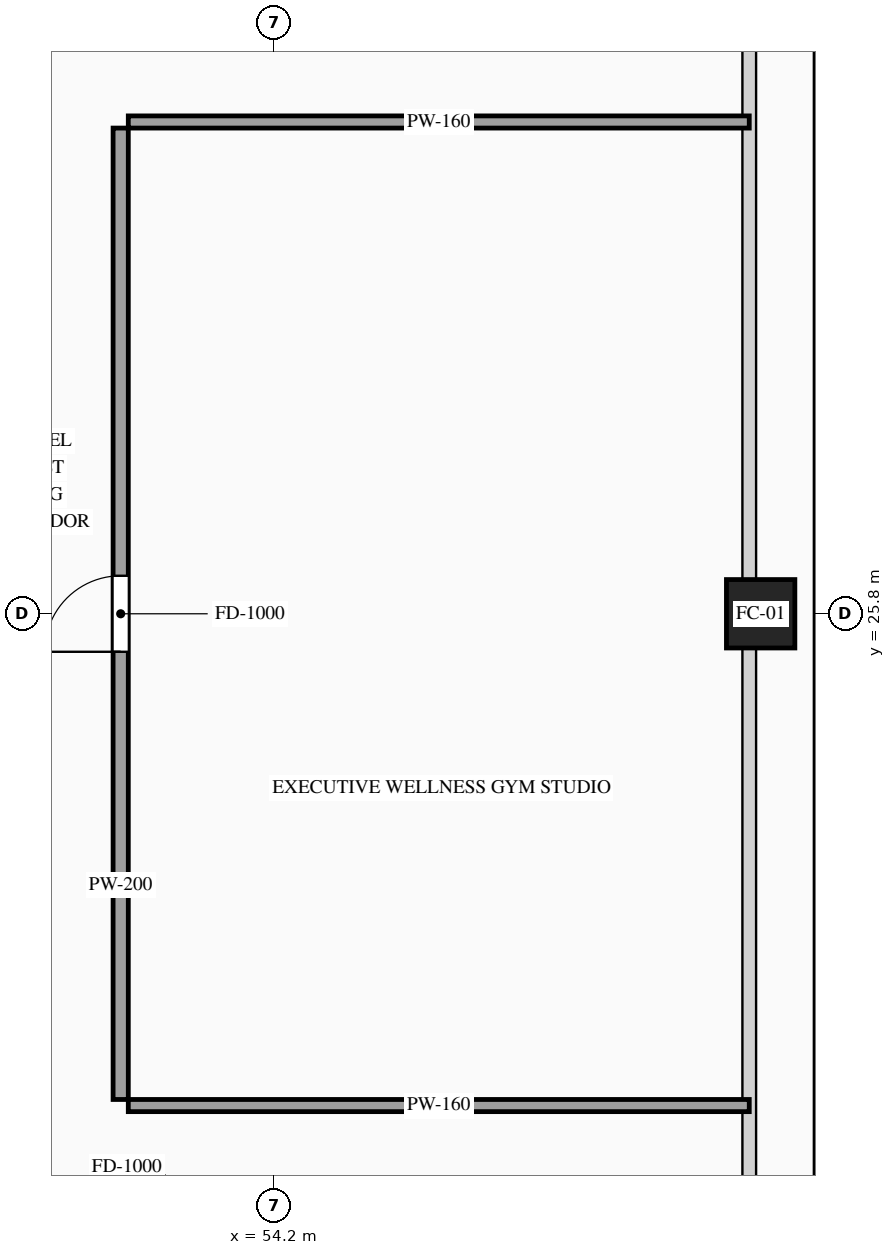
"""IFC4 building model, lengths in metres.
Left out: names, types, materials, properties, quantities, classifications, styles, units other than length and angle.
Written with IfcOpenShell. Run it as: python <this file> out.ifc"""

import sys

from ifc_helpers import new_model, si_unit, direction, frame, frame_2d, origin, origin_2d, place, context, subcontext, project, spatial, rectangle, hollow_rectangle, extrude, source, transform, mapped, element, fill, save


model = new_model("IFC4")
c1 = context("Model", 3, precision=1e-05, world=origin(), true_north=direction((0.0, 1.0)))
c2 = subcontext(c1, "Body", "Model", "MODEL_VIEW")
j1 = project(units=[si_unit("LENGTHUNIT", "METRE"), si_unit("PLANEANGLEUNIT", "RADIAN")], contexts=[c1])
p1 = place(None, origin())
s1 = spatial("IfcSite", under=j1, at=p1, CompositionType="ELEMENT")
p2 = place(p1, origin())
s2 = spatial("IfcBuilding", under=s1, at=p2, CompositionType="ELEMENT")
p3 = place(p2, frame((0.0, 0.0, 108.2)))
s3 = spatial("IfcBuildingStorey", under=s2, at=p3, CompositionType="ELEMENT", Elevation=108.2)
m1 = source(origin(), c2, "Body", "SweptSolid", [
    extrude(hollow_rectangle(XDim=0.9, YDim=0.9, WallThickness=0.042, at=origin_2d()), origin(), (0.0, 0.0, 1.0), 3.6),
])
p4 = place(p3, frame((60.6, 25.8, 0.0), z_axis=(0.0, 0.0, 1.0), x_axis=(1.0, 0.0, 0.0)))
e1 = element("IfcColumn", 1, at=p4, inside=s3, PredefinedType="COLUMN", context=c2, shape_type="MappedRepresentation", body=[
    mapped(m1, transform((0.0, 0.0, 0.0), scale=1.0)),
])
p5 = place(p3, frame((52.18, 19.41, 0.0), z_axis=(0.0, 0.0, 1.0), x_axis=(0.0, 1.0, 0.0)))
e2 = element("IfcWall", 2, at=p5, inside=s3, PredefinedType="PARTITIONING", context=c2, shape_type="SweptSolid", body=[
    extrude(rectangle(XDim=12.78, YDim=0.2, at=frame_2d((6.39, 0.0))), origin(), (0.0, 0.0, 1.0), 3.38),
])
p6 = place(p5, frame((5.89, 0.0, 0.0)))
e3 = element("IfcOpeningElement", 3, at=p6, cuts=e2, PredefinedType="OPENING", context=c2, shape_type="SweptSolid", body=[
    extrude(rectangle(XDim=1.0, YDim=2.2, at=frame_2d((0.5, 1.1))), frame((0.0, 0.115, 0.0), z_axis=(0.0, -1.0, 0.0), x_axis=(1.0, 0.0, 0.0)), (0.0, 0.0, 1.0), 0.23),
])
m2 = source(origin(), c2, "Body", "SweptSolid", [
    extrude(rectangle(XDim=8.17, YDim=0.16, at=frame_2d((4.085, 0.0))), origin(), (0.0, 0.0, 1.0), 2.875),
])
for number, where, z_axis, x_axis in (
    (4, (52.28, 19.33, 0.0), (0.0, 0.0, 1.0), (1.0, 0.0, 0.0)),
    (5, (52.28, 32.27, 0.0), (0.0, 0.0, 1.0), (1.0, 0.0, 0.0)),
):
    element("IfcWall", number, at=place(p3, frame(where, z_axis=z_axis, x_axis=x_axis)), inside=s3, PredefinedType="PARTITIONING", context=c2, shape_type="MappedRepresentation", body=[
        mapped(m2, transform((0.0, 0.0, 0.0), scale=1.0)),
    ])
m3 = source(origin(), c2, "Body", "SweptSolid", [
    extrude(rectangle(XDim=1.0, YDim=2.2, at=frame_2d((0.5, 1.1))), frame((0.0, 0.025, 0.0), z_axis=(0.0, -1.0, 0.0), x_axis=(1.0, 0.0, 0.0)), (0.0, 0.0, 1.0), 0.05),
])
p7 = place(p6, origin())
e6 = element("IfcDoor", 6, at=p7, inside=s3, OperationType="SINGLE_SWING_LEFT", PredefinedType="DOOR", context=c2, shape_type="MappedRepresentation", body=[
    mapped(m3, transform((0.0, 0.0, 0.0), scale=1.0)),
])
fill(e3, e6)
save(model, sys.argv[1])
